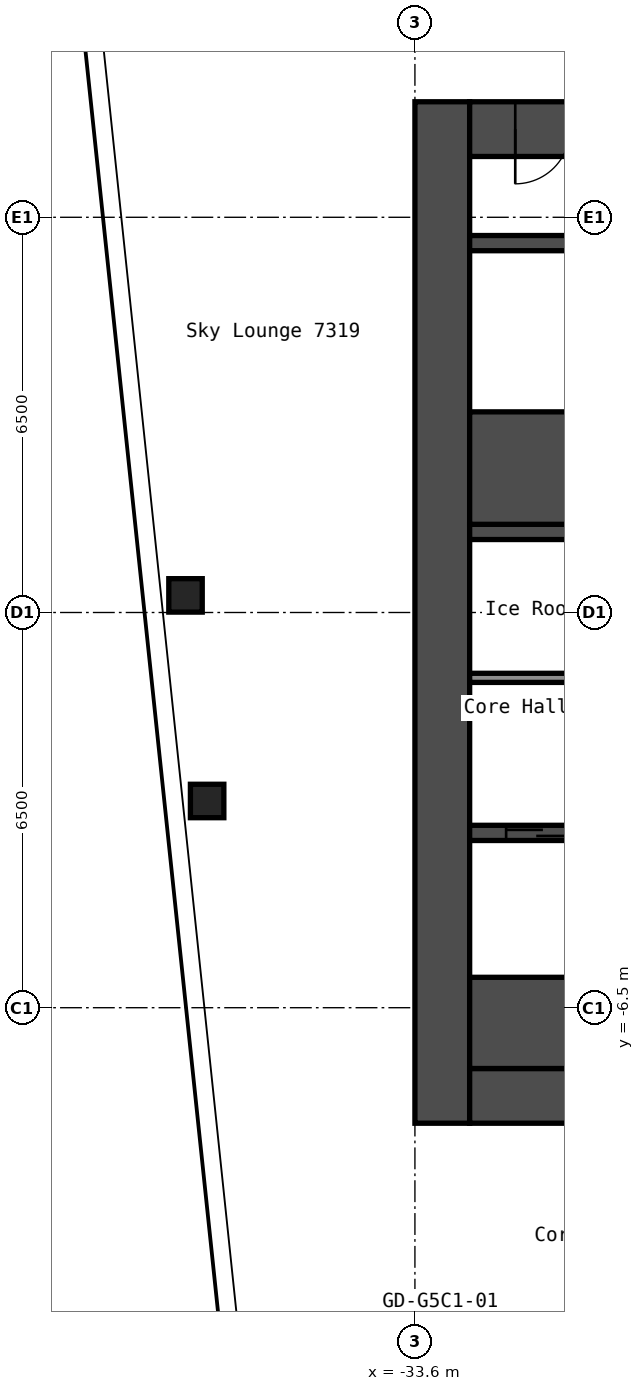
"""IFC4 building model, lengths in metres.
Left out: names, types, materials, properties, quantities, classifications, styles, units other than length and angle.
Written with IfcOpenShell. Run it as: python <this file> out.ifc"""

import sys

from ifc_helpers import new_model, si_unit, direction, frame, frame_2d, origin, origin_2d, place, context, subcontext, project, spatial, rectangle, hollow_rectangle, extrude, element, fill, save


model = new_model("IFC4")
c1 = context("Model", 3, precision=1e-05, world=origin(), true_north=direction((0.0, 1.0)))
c2 = subcontext(c1, "Body", "Model", "MODEL_VIEW")
j1 = project(units=[si_unit("LENGTHUNIT", "METRE"), si_unit("PLANEANGLEUNIT", "RADIAN")], contexts=[c1])
p1 = place(None, origin())
s1 = spatial("IfcSite", under=j1, at=p1, CompositionType="ELEMENT")
p2 = place(p1, origin())
s2 = spatial("IfcBuilding", under=s1, at=p2, CompositionType="ELEMENT")
p3 = place(p2, frame((0.0, 0.0, 258.2)))
s3 = spatial("IfcBuildingStorey", under=s2, at=p3, CompositionType="ELEMENT", Elevation=258.2)
for number, where, z_axis, x_axis in (
    (1, (-37.017, -3.1, 0.0), (0.0, 0.0, 1.0), (1.0, 0.0, 0.0)),
    (2, (-37.373, 0.281, 0.0), (0.0, 0.0, 1.0), (1.0, 0.0, 0.0)),
):
    element("IfcColumn", number, at=place(p3, frame(where, z_axis=z_axis, x_axis=x_axis)), inside=s3, PredefinedType="COLUMN", context=c2, shape_type="SweptSolid", body=[
        extrude(hollow_rectangle(XDim=0.55, YDim=0.55, WallThickness=0.022, InnerFilletRadius=0.033, OuterFilletRadius=0.055, at=origin_2d()), origin(), (0.0, 0.0, 1.0), 2.75),
    ])
p4 = place(p3, frame((-33.15, -8.4, 0.0), z_axis=(0.0, 0.0, 1.0), x_axis=(0.0, 1.0, 0.0)))
e3 = element("IfcWall", 3, at=p4, inside=s3, PredefinedType="SHEAR", context=c2, shape_type="SweptSolid", body=[
    extrude(rectangle(XDim=16.8, YDim=0.9, at=frame_2d((8.4, 0.0))), origin(), (0.0, 0.0, 1.0), 2.75),
])
p5 = place(p3, frame((-32.7, 7.95, 0.0), z_axis=(0.0, 0.0, 1.0), x_axis=(1.0, 0.0, 0.0)))
e4 = element("IfcWall", 4, at=p5, inside=s3, PredefinedType="SHEAR", context=c2, shape_type="SweptSolid", body=[
    extrude(rectangle(XDim=15.0, YDim=0.9, at=frame_2d((7.5, 0.0))), origin(), (0.0, 0.0, 1.0), 2.75),
])
p6 = place(p5, frame((3.4, 0.0, 0.0)))
e5 = element("IfcOpeningElement", 5, at=p6, cuts=e4, PredefinedType="OPENING", context=c2, shape_type="SweptSolid", body=[
    extrude(rectangle(XDim=1.2, YDim=2.1, at=frame_2d((0.6, 1.05))), frame((0.0, 0.46, 0.0), z_axis=(0.0, -1.0, 0.0), x_axis=(1.0, 0.0, 0.0)), (0.0, 0.0, 1.0), 0.92),
])
p7 = place(p5, frame((0.75, 0.0, 0.0)))
e6 = element("IfcOpeningElement", 6, at=p7, cuts=e4, PredefinedType="OPENING", context=c2, shape_type="SweptSolid", body=[
    extrude(rectangle(XDim=0.9, YDim=2.1, at=frame_2d((0.45, 1.05))), frame((0.0, 0.46, 0.0), z_axis=(0.0, -1.0, 0.0), x_axis=(1.0, 0.0, 0.0)), (0.0, 0.0, 1.0), 0.92),
])
p8 = place(p3, frame((-32.7, -7.95, 0.0), z_axis=(0.0, 0.0, 1.0), x_axis=(1.0, 0.0, 0.0)))
e7 = element("IfcWall", 7, at=p8, inside=s3, PredefinedType="SHEAR", context=c2, shape_type="SweptSolid", body=[
    extrude(rectangle(XDim=15.0, YDim=0.9, at=frame_2d((7.5, 0.0))), origin(), (0.0, 0.0, 1.0), 2.75),
])
p9 = place(p8, frame((11.45, 0.0, 0.0)))
e8 = element("IfcOpeningElement", 8, at=p9, cuts=e7, PredefinedType="OPENING", context=c2, shape_type="SweptSolid", body=[
    extrude(rectangle(XDim=1.0, YDim=2.1, at=frame_2d((0.5, 1.05))), frame((0.0, 0.46, 0.0), z_axis=(0.0, -1.0, 0.0), x_axis=(1.0, 0.0, 0.0)), (0.0, 0.0, 1.0), 0.92),
])
p10 = place(p3, frame((-32.7, 1.325, 0.0), z_axis=(0.0, 0.0, 1.0), x_axis=(1.0, 0.0, 0.0)))
e9 = element("IfcWall", 9, at=p10, inside=s3, PredefinedType="SHEAR", context=c2, shape_type="SweptSolid", body=[
    extrude(rectangle(XDim=5.05, YDim=0.25, at=frame_2d((2.525, 0.0))), origin(), (0.0, 0.0, 1.0), 2.75),
])
p11 = place(p10, frame((3.3, 0.0, 0.0)))
e10 = element("IfcOpeningElement", 10, at=p11, cuts=e9, PredefinedType="OPENING", context=c2, shape_type="SweptSolid", body=[
    extrude(rectangle(XDim=1.2, YDim=2.1, at=frame_2d((0.6, 1.05))), frame((0.0, 0.135, 0.0), z_axis=(0.0, -1.0, 0.0), x_axis=(1.0, 0.0, 0.0)), (0.0, 0.0, 1.0), 0.27),
])
p12 = place(p3, frame((-32.7, 2.375, 0.0), z_axis=(0.0, 0.0, 1.0), x_axis=(1.0, 0.0, 0.0)))
e11 = element("IfcWall", 11, at=p12, inside=s3, PredefinedType="SHEAR", context=c2, shape_type="SweptSolid", body=[
    extrude(rectangle(XDim=2.4, YDim=1.85, at=frame_2d((1.2, 0.0))), origin(), (0.0, 0.0, 1.0), 2.75),
])
p13 = place(p3, frame((-32.7, 6.075, 0.0), z_axis=(0.0, 0.0, 1.0), x_axis=(1.0, 0.0, 0.0)))
e12 = element("IfcWall", 12, at=p13, inside=s3, PredefinedType="SHEAR", context=c2, shape_type="SweptSolid", body=[
    extrude(rectangle(XDim=2.4, YDim=0.25, at=frame_2d((1.2, 0.0))), origin(), (0.0, 0.0, 1.0), 2.75),
])
p14 = place(p3, frame((-32.7, -3.625, 0.0), z_axis=(0.0, 0.0, 1.0), x_axis=(1.0, 0.0, 0.0)))
e13 = element("IfcWall", 13, at=p14, inside=s3, PredefinedType="SHEAR", context=c2, shape_type="SweptSolid", body=[
    extrude(rectangle(XDim=4.55, YDim=0.25, at=frame_2d((2.275, 0.0))), origin(), (0.0, 0.0, 1.0), 2.75),
])
p15 = place(p14, frame((2.85, 0.0, 0.0)))
e14 = element("IfcOpeningElement", 14, at=p15, cuts=e13, PredefinedType="OPENING", context=c2, shape_type="SweptSolid", body=[
    extrude(rectangle(XDim=1.1, YDim=2.1, at=frame_2d((0.55, 1.05))), frame((0.0, 0.135, 0.0), z_axis=(0.0, -1.0, 0.0), x_axis=(1.0, 0.0, 0.0)), (0.0, 0.0, 1.0), 0.27),
])
p16 = place(p14, frame((0.6, 0.0, 0.0)))
e15 = element("IfcOpeningElement", 15, at=p16, cuts=e13, PredefinedType="OPENING", context=c2, shape_type="SweptSolid", body=[
    extrude(rectangle(XDim=1.1, YDim=2.1, at=frame_2d((0.55, 1.05))), frame((0.0, 0.135, 0.0), z_axis=(0.0, -1.0, 0.0), x_axis=(1.0, 0.0, 0.0)), (0.0, 0.0, 1.0), 0.27),
])
p17 = place(p3, frame((-32.7, -6.75, 0.0), z_axis=(0.0, 0.0, 1.0), x_axis=(1.0, 0.0, 0.0)))
e16 = element("IfcWall", 16, at=p17, inside=s3, PredefinedType="SHEAR", context=c2, shape_type="SweptSolid", body=[
    extrude(rectangle(XDim=4.55, YDim=1.5, at=frame_2d((2.275, 0.0))), origin(), (0.0, 0.0, 1.0), 2.75),
])
p18 = place(p3, frame((-32.7, -1.075, 0.0), z_axis=(0.0, 0.0, 1.0), x_axis=(1.0, 0.0, 0.0)))
e17 = element("IfcWall", 17, at=p18, inside=s3, PredefinedType="PARTITIONING", context=c2, shape_type="SweptSolid", body=[
    extrude(rectangle(XDim=3.0, YDim=0.15, at=frame_2d((1.5, 0.0))), origin(), (0.0, 0.0, 1.0), 2.75),
])
p19 = place(p3, frame((-36.712, -12.705, 0.0), z_axis=(0.0, 0.0, 1.0), x_axis=(0.994522460242, 0.104523088709, 0.0)))
e18 = element("IfcWall", 18, at=p19, inside=s3, PredefinedType="PARTITIONING", context=c2, shape_type="SweptSolid", body=[
    extrude(rectangle(XDim=21.3, YDim=0.2, at=frame_2d((10.65, 0.0))), origin(), (0.0, 0.0, 1.0), 2.75),
])
p20 = place(p19, frame((3.05, 0.0, 0.0)))
e19 = element("IfcOpeningElement", 19, at=p20, cuts=e18, PredefinedType="OPENING", context=c2, shape_type="SweptSolid", body=[
    extrude(rectangle(XDim=1.0, YDim=2.1, at=frame_2d((0.5, 1.05))), frame((0.0, 0.11, 0.0), z_axis=(0.0, -1.0, 0.0), x_axis=(1.0, 0.0, 0.0)), (0.0, 0.0, 1.0), 0.22),
])
p21 = place(p19, frame((8.2, 0.0, 0.0)))
e20 = element("IfcOpeningElement", 20, at=p21, cuts=e18, PredefinedType="OPENING", context=c2, shape_type="SweptSolid", body=[
    extrude(rectangle(XDim=1.0, YDim=2.1, at=frame_2d((0.5, 1.05))), frame((0.0, 0.11, 0.0), z_axis=(0.0, -1.0, 0.0), x_axis=(1.0, 0.0, 0.0)), (0.0, 0.0, 1.0), 0.22),
])
p22 = place(p19, frame((14.8, 0.0, 0.0)))
e21 = element("IfcOpeningElement", 21, at=p22, cuts=e18, PredefinedType="OPENING", context=c2, shape_type="SweptSolid", body=[
    extrude(rectangle(XDim=0.9, YDim=2.1, at=frame_2d((0.45, 1.05))), frame((0.0, 0.11, 0.0), z_axis=(0.0, -1.0, 0.0), x_axis=(1.0, 0.0, 0.0)), (0.0, 0.0, 1.0), 0.22),
])
p23 = place(p19, frame((19.0, 0.0, 0.0)))
e22 = element("IfcOpeningElement", 22, at=p23, cuts=e18, PredefinedType="OPENING", context=c2, shape_type="SweptSolid", body=[
    extrude(rectangle(XDim=0.9, YDim=2.1, at=frame_2d((0.45, 1.05))), frame((0.0, 0.11, 0.0), z_axis=(0.0, -1.0, 0.0), x_axis=(1.0, 0.0, 0.0)), (0.0, 0.0, 1.0), 0.22),
])
p24 = place(p7, origin())
e23 = element("IfcDoor", 23, at=p24, inside=s3, OperationType="SINGLE_SWING_LEFT", PredefinedType="DOOR", context=c2, shape_type="SweptSolid", body=[
    extrude(rectangle(XDim=0.9, YDim=2.1, at=frame_2d((0.45, 1.05))), frame((0.0, 0.025, 0.0), z_axis=(0.0, -1.0, 0.0), x_axis=(1.0, 0.0, 0.0)), (0.0, 0.0, 1.0), 0.05),
])
fill(e6, e23)
p25 = place(p16, origin())
e24 = element("IfcDoor", 24, at=p25, inside=s3, OperationType="DOUBLE_DOOR_SLIDING", PredefinedType="DOOR", context=c2, shape_type="SweptSolid", body=[
    extrude(rectangle(XDim=1.1, YDim=2.1, at=frame_2d((0.55, 1.05))), frame((0.0, 0.025, 0.0), z_axis=(0.0, -1.0, 0.0), x_axis=(1.0, 0.0, 0.0)), (0.0, 0.0, 1.0), 0.05),
])
fill(e15, e24)
save(model, sys.argv[1])
